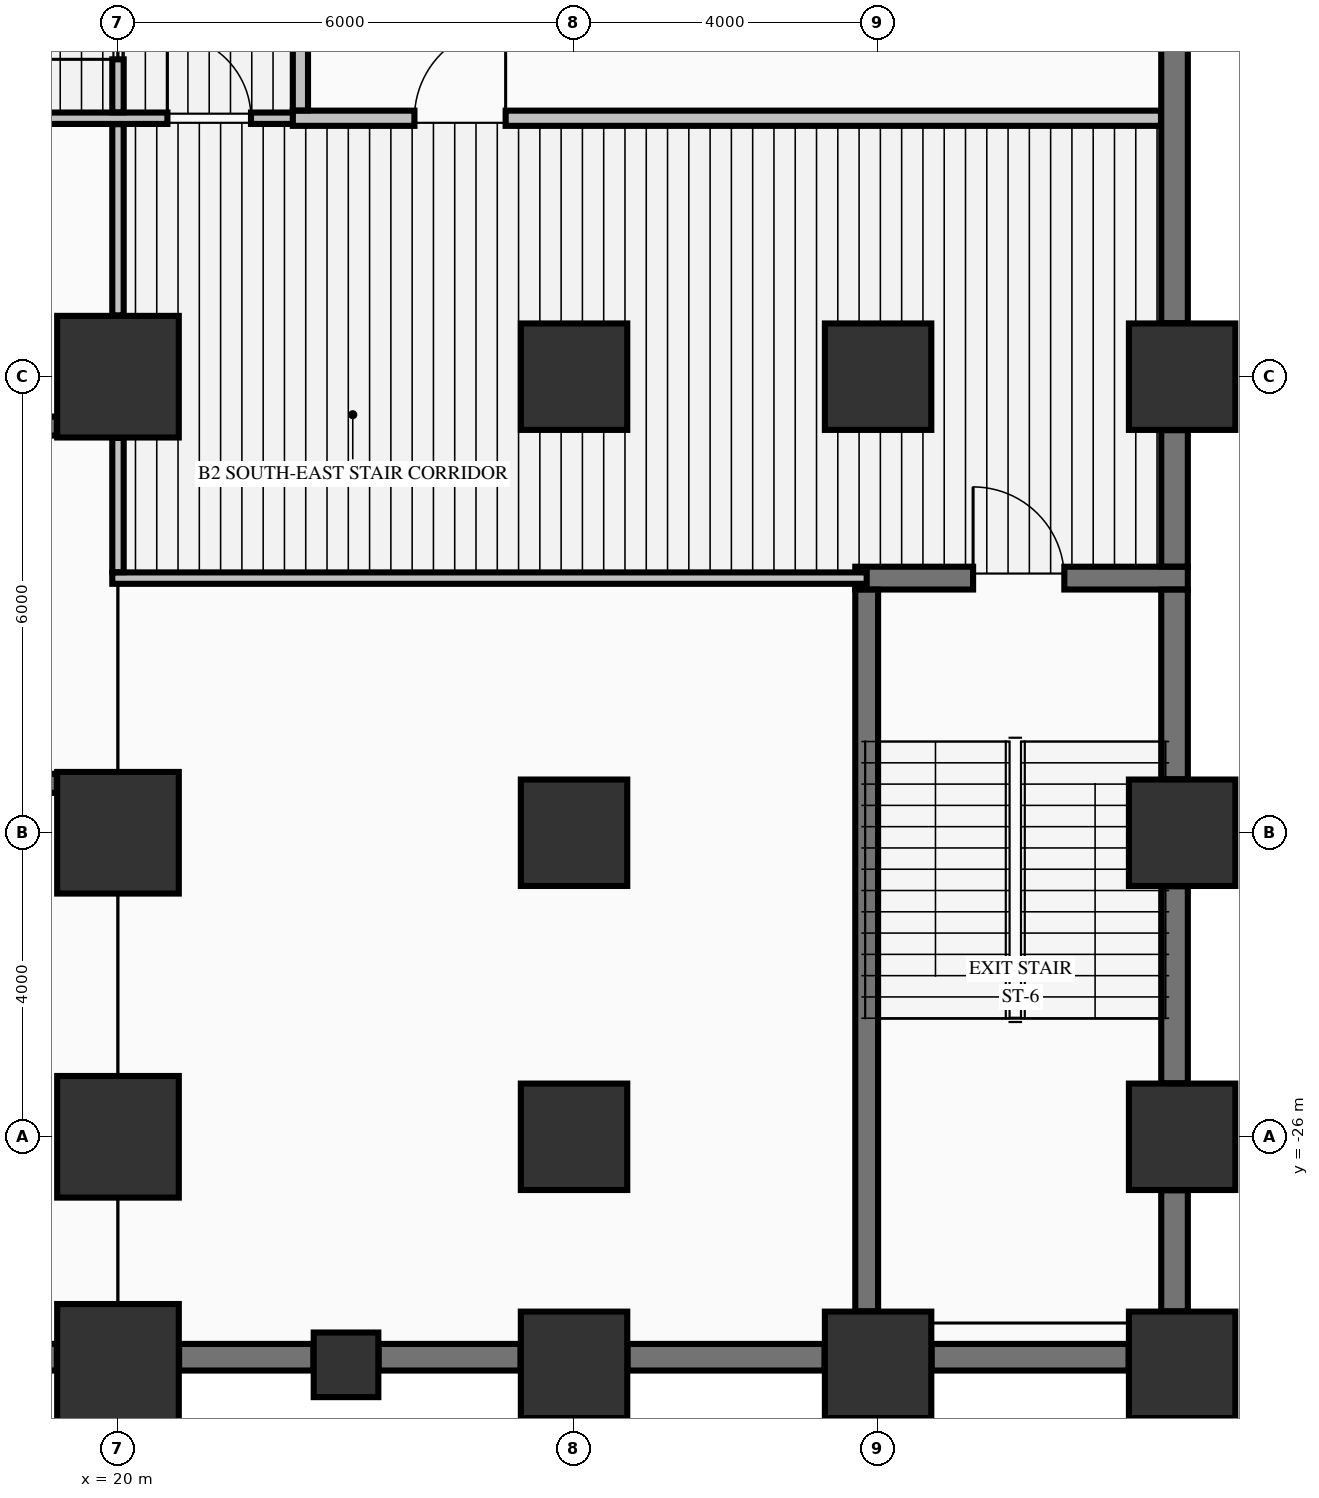
"""IFC4 building model, lengths in metres.
Left out: names, types, materials, properties, quantities, classifications, styles, units other than length and angle.
Written with IfcOpenShell. Run it as: python <this file> out.ifc"""

import sys

from ifc_helpers import new_model, si_unit, direction, frame, frame_2d, origin, origin_2d, place, context, subcontext, project, spatial, rectangle, extrude, element, fill, save


model = new_model("IFC4")
c1 = context("Model", 3, precision=1e-05, world=origin(), true_north=direction((0.0, 1.0)))
c2 = subcontext(c1, "Body", "Model", "MODEL_VIEW")
j1 = project(units=[si_unit("LENGTHUNIT", "METRE"), si_unit("PLANEANGLEUNIT", "RADIAN")], contexts=[c1])
p1 = place(None, origin())
s1 = spatial("IfcSite", under=j1, at=p1, CompositionType="ELEMENT")
p2 = place(p1, origin())
s2 = spatial("IfcBuilding", under=s1, at=p2, CompositionType="ELEMENT")
p3 = place(p2, frame((0.0, 0.0, -9.1)))
s3 = spatial("IfcBuildingStorey", under=s2, at=p3, CompositionType="ELEMENT", Elevation=-9.1)
for number, where, z_axis, x_axis in (
    (1, (20.0, -29.0, -0.45), (0.0, 0.0, 1.0), (1.0, 0.0, 0.0)),
    (2, (20.0, -26.0, -0.45), (0.0, 0.0, 1.0), (1.0, 0.0, 0.0)),
    (3, (20.0, -22.0, -0.45), (0.0, 0.0, 1.0), (1.0, 0.0, 0.0)),
    (4, (20.0, -16.0, -0.45), (0.0, 0.0, 1.0), (1.0, 0.0, 0.0)),
):
    element("IfcColumn", number, at=place(p3, frame(where, z_axis=z_axis, x_axis=x_axis)), inside=s3, PredefinedType="COLUMN", context=c2, shape_type="SweptSolid", body=[
        extrude(rectangle(XDim=1.6, YDim=1.6, at=origin_2d()), origin(), (0.0, 0.0, 1.0), 4.65),
    ])
for number, where, z_axis, x_axis in (
    (5, (26.0, -29.0, -0.45), (0.0, 0.0, 1.0), (1.0, 0.0, 0.0)),
    (6, (26.0, -26.0, -0.45), (0.0, 0.0, 1.0), (1.0, 0.0, 0.0)),
    (7, (26.0, -22.0, -0.45), (0.0, 0.0, 1.0), (1.0, 0.0, 0.0)),
    (8, (26.0, -16.0, -0.45), (0.0, 0.0, 1.0), (1.0, 0.0, 0.0)),
    (9, (30.0, -29.0, -0.45), (0.0, 0.0, 1.0), (1.0, 0.0, 0.0)),
    (10, (30.0, -16.0, -0.45), (0.0, 0.0, 1.0), (1.0, 0.0, 0.0)),
    (11, (34.0, -29.0, -0.45), (0.0, 0.0, 1.0), (1.0, 0.0, 0.0)),
    (12, (34.0, -26.0, -0.45), (0.0, 0.0, 1.0), (1.0, 0.0, 0.0)),
    (13, (34.0, -22.0, -0.45), (0.0, 0.0, 1.0), (1.0, 0.0, 0.0)),
    (14, (34.0, -16.0, -0.45), (0.0, 0.0, 1.0), (1.0, 0.0, 0.0)),
):
    element("IfcColumn", number, at=place(p3, frame(where, z_axis=z_axis, x_axis=x_axis)), inside=s3, PredefinedType="COLUMN", context=c2, shape_type="SweptSolid", body=[
        extrude(rectangle(XDim=1.4, YDim=1.4, at=origin_2d()), origin(), (0.0, 0.0, 1.0), 4.65),
    ])
p4 = place(p3, frame((23.0, -29.0, -0.45), z_axis=(0.0, 0.0, 1.0), x_axis=(1.0, 0.0, 0.0)))
e15 = element("IfcColumn", 15, at=p4, inside=s3, PredefinedType="PILASTER", context=c2, shape_type="SweptSolid", body=[
    extrude(rectangle(XDim=0.85, YDim=0.85, at=origin_2d()), origin(), (0.0, 0.0, 1.0), 4.65),
])
p5 = place(p3, frame((11.804, -28.9, 0.0), z_axis=(0.0, 0.0, 1.0), x_axis=(1.0, 0.0, 0.0)))
e16 = element("IfcWall", 16, at=p5, inside=s3, PredefinedType="SHEAR", context=c2, shape_type="SweptSolid", body=[
    extrude(rectangle(XDim=7.392, YDim=0.35, at=frame_2d((3.696, 0.0))), origin(), (0.0, 0.0, 1.0), 4.2),
])
p6 = place(p3, frame((20.804, -28.9, 0.0), z_axis=(0.0, 0.0, 1.0), x_axis=(1.0, 0.0, 0.0)))
e17 = element("IfcWall", 17, at=p6, inside=s3, PredefinedType="SHEAR", context=c2, shape_type="SweptSolid", body=[
    extrude(rectangle(XDim=1.767, YDim=0.35, at=frame_2d((0.884, 0.0))), origin(), (0.0, 0.0, 1.0), 4.2),
])
p7 = place(p3, frame((23.429, -28.9, 0.0), z_axis=(0.0, 0.0, 1.0), x_axis=(1.0, 0.0, 0.0)))
e18 = element("IfcWall", 18, at=p7, inside=s3, PredefinedType="SHEAR", context=c2, shape_type="SweptSolid", body=[
    extrude(rectangle(XDim=1.867, YDim=0.35, at=frame_2d((0.934, 0.0))), origin(), (0.0, 0.0, 1.0), 4.2),
])
for number, where, z_axis, x_axis in (
    (19, (26.704, -28.9, 0.0), (0.0, 0.0, 1.0), (1.0, 0.0, 0.0)),
    (20, (30.704, -28.9, 0.0), (0.0, 0.0, 1.0), (1.0, 0.0, 0.0)),
):
    element("IfcWall", number, at=place(p3, frame(where, z_axis=z_axis, x_axis=x_axis)), inside=s3, PredefinedType="SHEAR", context=c2, shape_type="SweptSolid", body=[
        extrude(rectangle(XDim=2.592, YDim=0.35, at=frame_2d((1.296, 0.0))), origin(), (0.0, 0.0, 1.0), 4.2),
    ])
p8 = place(p3, frame((11.804, -21.35, 0.0), z_axis=(0.0, 0.0, 1.0), x_axis=(1.0, 0.0, 0.0)))
e21 = element("IfcWall", 21, at=p8, inside=s3, PredefinedType="SOLIDWALL", context=c2, shape_type="SweptSolid", body=[
    extrude(rectangle(XDim=7.392, YDim=0.25, at=frame_2d((3.696, 0.0))), origin(), (0.0, 0.0, 1.0), 4.2),
])
p9 = place(p3, frame((29.7, -18.65, 0.0), z_axis=(0.0, 0.0, 1.0), x_axis=(1.0, 0.0, 0.0)))
e22 = element("IfcWall", 22, at=p9, inside=s3, PredefinedType="SHEAR", context=c2, shape_type="SweptSolid", body=[
    extrude(rectangle(XDim=4.375, YDim=0.3, at=frame_2d((2.188, 0.0))), origin(), (0.0, 0.0, 1.0), 4.2),
])
p10 = place(p9, frame((1.55, 0.0, 0.0)))
e23 = element("IfcOpeningElement", 23, at=p10, cuts=e22, PredefinedType="OPENING", context=c2, shape_type="SweptSolid", body=[
    extrude(rectangle(XDim=1.2, YDim=2.15, at=frame_2d((0.6, 1.075))), frame((0.0, 0.16, 0.0), z_axis=(0.0, -1.0, 0.0), x_axis=(1.0, 0.0, 0.0)), (0.0, 0.0, 1.0), 0.32),
])
p11 = place(p3, frame((11.804, -16.65, 0.0), z_axis=(0.0, 0.0, 1.0), x_axis=(1.0, 0.0, 0.0)))
e24 = element("IfcWall", 24, at=p11, inside=s3, PredefinedType="SOLIDWALL", context=c2, shape_type="SweptSolid", body=[
    extrude(rectangle(XDim=7.392, YDim=0.25, at=frame_2d((3.696, 0.0))), origin(), (0.0, 0.0, 1.0), 4.2),
])
p12 = place(p3, frame((19.925, -18.65, 0.0), z_axis=(0.0, 0.0, 1.0), x_axis=(1.0, 0.0, 0.0)))
e25 = element("IfcWall", 25, at=p12, inside=s3, PredefinedType="PARTITIONING", context=c2, shape_type="SweptSolid", body=[
    extrude(rectangle(XDim=9.925, YDim=0.15, at=frame_2d((4.962, 0.0))), origin(), (0.0, 0.0, 1.0), 4.2),
])
p13 = place(p3, frame((-33.722, -12.6, 0.0), z_axis=(0.0, 0.0, 1.0), x_axis=(1.0, 0.0, 0.0)))
e26 = element("IfcWall", 26, at=p13, inside=s3, PredefinedType="PARTITIONING", context=c2, shape_type="SweptSolid", body=[
    extrude(rectangle(XDim=56.222, YDim=0.15, at=frame_2d((28.111, 0.0))), origin(), (0.0, 0.0, 1.0), 3.74),
])
p14 = place(p13, frame((11.972, 0.0, 0.0)))
e27 = element("IfcOpeningElement", 27, at=p14, cuts=e26, PredefinedType="OPENING", context=c2, shape_type="SweptSolid", body=[
    extrude(rectangle(XDim=1.1, YDim=2.15, at=frame_2d((0.55, 1.075))), frame((0.0, 0.085, 0.0), z_axis=(0.0, -1.0, 0.0), x_axis=(1.0, 0.0, 0.0)), (0.0, 0.0, 1.0), 0.17),
])
p15 = place(p13, frame((54.372, 0.0, 0.0)))
e28 = element("IfcOpeningElement", 28, at=p15, cuts=e26, PredefinedType="OPENING", context=c2, shape_type="SweptSolid", body=[
    extrude(rectangle(XDim=1.1, YDim=2.15, at=frame_2d((0.55, 1.075))), frame((0.0, 0.085, 0.0), z_axis=(0.0, -1.0, 0.0), x_axis=(1.0, 0.0, 0.0)), (0.0, 0.0, 1.0), 0.17),
])
p16 = place(p13, frame((38.622, 0.0, 0.0)))
e29 = element("IfcOpeningElement", 29, at=p16, cuts=e26, PredefinedType="OPENING", context=c2, shape_type="SweptSolid", body=[
    extrude(rectangle(XDim=1.2, YDim=2.15, at=frame_2d((0.6, 1.075))), frame((0.0, 0.085, 0.0), z_axis=(0.0, -1.0, 0.0), x_axis=(1.0, 0.0, 0.0)), (0.0, 0.0, 1.0), 0.17),
])
p17 = place(p3, frame((22.3, -12.6, 0.0), z_axis=(0.0, 0.0, 1.0), x_axis=(1.0, 0.0, 0.0)))
e30 = element("IfcWall", 30, at=p17, inside=s3, PredefinedType="PARTITIONING", context=c2, shape_type="SweptSolid", body=[
    extrude(rectangle(XDim=11.422, YDim=0.2, at=frame_2d((5.711, 0.0))), origin(), (0.0, 0.0, 1.0), 3.74),
])
p18 = place(p17, frame((1.6, 0.0, 0.0)))
e31 = element("IfcOpeningElement", 31, at=p18, cuts=e30, PredefinedType="OPENING", context=c2, shape_type="SweptSolid", body=[
    extrude(rectangle(XDim=1.2, YDim=2.15, at=frame_2d((0.6, 1.075))), frame((0.0, 0.11, 0.0), z_axis=(0.0, -1.0, 0.0), x_axis=(1.0, 0.0, 0.0)), (0.0, 0.0, 1.0), 0.22),
])
p19 = place(p3, frame((29.85, -28.296, 0.0), z_axis=(0.0, 0.0, 1.0), x_axis=(0.0, 1.0, 0.0)))
e32 = element("IfcWall", 32, at=p19, inside=s3, PredefinedType="SHEAR", context=c2, shape_type="SweptSolid", body=[
    extrude(rectangle(XDim=9.494, YDim=0.3, at=frame_2d((4.747, 0.0))), origin(), (0.0, 0.0, 1.0), 4.2),
])
p20 = place(p3, frame((33.9, -28.296, 0.0), z_axis=(0.0, 0.0, 1.0), x_axis=(0.0, 1.0, 0.0)))
e33 = element("IfcWall", 33, at=p20, inside=s3, PredefinedType="SHEAR", context=c2, shape_type="SweptSolid", body=[
    extrude(rectangle(XDim=1.592, YDim=0.35, at=frame_2d((0.796, 0.0))), origin(), (0.0, 0.0, 1.0), 4.2),
])
p21 = place(p3, frame((33.9, -25.296, 0.0), z_axis=(0.0, 0.0, 1.0), x_axis=(0.0, 1.0, 0.0)))
e34 = element("IfcWall", 34, at=p21, inside=s3, PredefinedType="SHEAR", context=c2, shape_type="SweptSolid", body=[
    extrude(rectangle(XDim=2.592, YDim=0.35, at=frame_2d((1.296, 0.0))), origin(), (0.0, 0.0, 1.0), 4.2),
])
p22 = place(p3, frame((33.9, -21.296, 0.0), z_axis=(0.0, 0.0, 1.0), x_axis=(0.0, 1.0, 0.0)))
e35 = element("IfcWall", 35, at=p22, inside=s3, PredefinedType="SHEAR", context=c2, shape_type="SweptSolid", body=[
    extrude(rectangle(XDim=2.494, YDim=0.35, at=frame_2d((1.247, 0.0))), origin(), (0.0, 0.0, 1.0), 4.2),
])
p23 = place(p3, frame((33.9, -18.498, 0.0), z_axis=(0.0, 0.0, 1.0), x_axis=(0.0, 1.0, 0.0)))
e36 = element("IfcWall", 36, at=p23, inside=s3, PredefinedType="SHEAR", context=c2, shape_type="SweptSolid", body=[
    extrude(rectangle(XDim=1.794, YDim=0.35, at=frame_2d((0.897, 0.0))), origin(), (0.0, 0.0, 1.0), 4.2),
])
p24 = place(p3, frame((33.9, -15.296, 0.0), z_axis=(0.0, 0.0, 1.0), x_axis=(0.0, 1.0, 0.0)))
e37 = element("IfcWall", 37, at=p24, inside=s3, PredefinedType="SHEAR", context=c2, shape_type="SweptSolid", body=[
    extrude(rectangle(XDim=5.592, YDim=0.35, at=frame_2d((2.796, 0.0))), origin(), (0.0, 0.0, 1.0), 4.2),
])
p25 = place(p3, frame((20.0, -18.572, 0.0), z_axis=(0.0, 0.0, 1.0), x_axis=(0.0, 1.0, 0.0)))
e38 = element("IfcWall", 38, at=p25, inside=s3, PredefinedType="PARTITIONING", context=c2, shape_type="SweptSolid", body=[
    extrude(rectangle(XDim=1.766, YDim=0.15, at=frame_2d((0.883, 0.0))), origin(), (0.0, 0.0, 1.0), 3.242),
])
p26 = place(p3, frame((20.0, -15.194, 0.0), z_axis=(0.0, 0.0, 1.0), x_axis=(0.0, 1.0, 0.0)))
e39 = element("IfcWall", 39, at=p26, inside=s3, PredefinedType="PARTITIONING", context=c2, shape_type="SweptSolid", body=[
    extrude(rectangle(XDim=2.516, YDim=0.15, at=frame_2d((1.258, 0.0))), origin(), (0.0, 0.0, 1.0), 3.242),
])
p27 = place(p3, frame((20.0, -12.522, 0.0), z_axis=(0.0, 0.0, 1.0), x_axis=(0.0, 1.0, 0.0)))
e40 = element("IfcWall", 40, at=p27, inside=s3, PredefinedType="PARTITIONING", context=c2, shape_type="SweptSolid", body=[
    extrude(rectangle(XDim=2.394, YDim=0.15, at=frame_2d((1.197, 0.0))), origin(), (0.0, 0.0, 1.0), 3.242),
])
p28 = place(p27, frame((0.697, 0.0, 0.0)))
e41 = element("IfcOpeningElement", 41, at=p28, cuts=e40, PredefinedType="OPENING", context=c2, shape_type="SweptSolid", body=[
    extrude(rectangle(XDim=1.05, YDim=2.15, at=frame_2d((0.525, 1.075))), frame((0.0, 0.085, 0.0), z_axis=(0.0, -1.0, 0.0), x_axis=(1.0, 0.0, 0.0)), (0.0, 0.0, 1.0), 0.17),
])
p29 = place(p3, frame((22.4, -12.497, 0.0), z_axis=(0.0, 0.0, 1.0), x_axis=(0.0, 1.0, 0.0)))
e42 = element("IfcWall", 42, at=p29, inside=s3, PredefinedType="PARTITIONING", context=c2, shape_type="SweptSolid", body=[
    extrude(rectangle(XDim=12.394, YDim=0.2, at=frame_2d((6.197, 0.0))), origin(), (0.0, 0.0, 1.0), 4.2),
])
p30 = place(p10, origin())
e43 = element("IfcDoor", 43, at=p30, inside=s3, OperationType="SINGLE_SWING_LEFT", PredefinedType="DOOR", context=c2, shape_type="SweptSolid", body=[
    extrude(rectangle(XDim=1.2, YDim=2.15, at=frame_2d((0.6, 1.075))), frame((0.0, 0.025, 0.0), z_axis=(0.0, -1.0, 0.0), x_axis=(1.0, 0.0, 0.0)), (0.0, 0.0, 1.0), 0.05),
])
fill(e23, e43)
p31 = place(p28, origin())
e44 = element("IfcDoor", 44, at=p31, inside=s3, OperationType="SINGLE_SWING_LEFT", PredefinedType="DOOR", context=c2, shape_type="SweptSolid", body=[
    extrude(rectangle(XDim=1.05, YDim=2.15, at=frame_2d((0.525, 1.075))), frame((0.0, 0.025, 0.0), z_axis=(0.0, -1.0, 0.0), x_axis=(1.0, 0.0, 0.0)), (0.0, 0.0, 1.0), 0.05),
])
fill(e41, e44)
p32 = place(p15, origin())
e45 = element("IfcDoor", 45, at=p32, inside=s3, OperationType="SINGLE_SWING_LEFT", PredefinedType="DOOR", context=c2, shape_type="SweptSolid", body=[
    extrude(rectangle(XDim=1.1, YDim=2.15, at=frame_2d((0.55, 1.075))), frame((0.0, 0.025, 0.0), z_axis=(0.0, -1.0, 0.0), x_axis=(1.0, 0.0, 0.0)), (0.0, 0.0, 1.0), 0.05),
])
fill(e28, e45)
p33 = place(p18, origin())
e46 = element("IfcDoor", 46, at=p33, inside=s3, OperationType="SINGLE_SWING_RIGHT", PredefinedType="DOOR", context=c2, shape_type="SweptSolid", body=[
    extrude(rectangle(XDim=1.2, YDim=2.15, at=frame_2d((0.6, 1.075))), frame((0.0, 0.025, 0.0), z_axis=(0.0, -1.0, 0.0), x_axis=(1.0, 0.0, 0.0)), (0.0, 0.0, 1.0), 0.05),
])
fill(e31, e46)
save(model, sys.argv[1])
